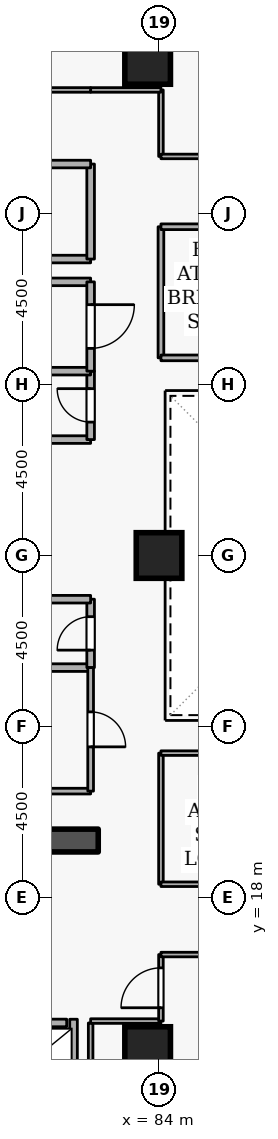
"""IFC4 building model, lengths in metres.
Left out: names, types, materials, properties, quantities, classifications, styles, units other than length and angle.
Written with IfcOpenShell. Run it as: python <this file> out.ifc"""

import sys

from ifc_helpers import new_model, si_unit, direction, frame, frame_2d, origin, origin_2d, place, context, subcontext, project, spatial, rectangle, extrude, element, fill, save


model = new_model("IFC4")
c1 = context("Model", 3, precision=1e-05, world=origin(), true_north=direction((0.0, 1.0)))
c2 = subcontext(c1, "Body", "Model", "MODEL_VIEW")
j1 = project(units=[si_unit("LENGTHUNIT", "METRE"), si_unit("PLANEANGLEUNIT", "RADIAN")], contexts=[c1])
p1 = place(None, origin())
s1 = spatial("IfcSite", under=j1, at=p1, CompositionType="ELEMENT")
p2 = place(p1, origin())
s2 = spatial("IfcBuilding", under=s1, at=p2, CompositionType="ELEMENT")
p3 = place(p2, frame((0.0, 0.0, 108.9)))
s3 = spatial("IfcBuildingStorey", under=s2, at=p3, CompositionType="ELEMENT", Elevation=108.9)
p4 = place(p3, frame((76.7, 19.5, 0.0), z_axis=(0.0, 0.0, 1.0), x_axis=(1.0, 0.0, 0.0)))
e1 = element("IfcWall", 1, at=p4, inside=s3, PredefinedType="SHEAR", context=c2, shape_type="SweptSolid", body=[
    extrude(rectangle(XDim=5.7, YDim=0.6, at=frame_2d((2.85, 0.0))), origin(), (0.0, 0.0, 1.0), 3.6),
])
for number, where, z_axis, x_axis in (
    (2, (83.7, 14.0, 0.0), (0.0, 0.0, 1.0), (1.0, 0.0, 0.0)),
    (3, (83.7, 40.0, 0.0), (0.0, 0.0, 1.0), (1.0, 0.0, 0.0)),
    (4, (84.0, 27.0, 0.0), (0.0, 0.0, 1.0), (1.0, 0.0, 0.0)),
):
    element("IfcColumn", number, at=place(p3, frame(where, z_axis=z_axis, x_axis=x_axis)), inside=s3, PredefinedType="COLUMN", context=c2, shape_type="SweptSolid", body=[
        extrude(rectangle(XDim=1.2, YDim=1.2, at=origin_2d()), origin(), (0.0, 0.0, 1.0), 3.6),
    ])
p5 = place(p3, frame((79.63, 14.7, 0.0), z_axis=(0.0, 0.0, 1.0), x_axis=(1.0, 0.0, 0.0)))
e5 = element("IfcWall", 5, at=p5, inside=s3, PredefinedType="STANDARD", context=c2, shape_type="SweptSolid", body=[
    extrude(rectangle(XDim=1.94, YDim=0.2, at=frame_2d((0.97, 0.0))), origin(), (0.0, 0.0, 1.0), 3.34),
])
p6 = place(p5, frame((0.46, 0.0, 0.0)))
e6 = element("IfcOpeningElement", 6, at=p6, cuts=e5, PredefinedType="OPENING", context=c2, shape_type="SweptSolid", body=[
    extrude(rectangle(XDim=1.02, YDim=2.06, at=frame_2d((0.51, 1.03))), frame((0.0, 0.11, 0.0), z_axis=(0.0, -1.0, 0.0), x_axis=(1.0, 0.0, 0.0)), (0.0, 0.0, 1.0), 0.22),
])
p7 = place(p3, frame((81.75, 12.612, 0.0), z_axis=(0.0, 0.0, 1.0), x_axis=(0.0, 1.0, 0.0)))
e7 = element("IfcWall", 7, at=p7, inside=s3, PredefinedType="STANDARD", context=c2, shape_type="SweptSolid", body=[
    extrude(rectangle(XDim=2.186, YDim=0.2, at=frame_2d((1.093, 0.0))), origin(), (0.0, 0.0, 1.0), 3.34),
])
p8 = place(p3, frame((79.9, 34.8, 0.0), z_axis=(0.0, 0.0, 1.0), x_axis=(1.0, 0.0, 0.0)))
e8 = element("IfcWall", 8, at=p8, inside=s3, PredefinedType="STANDARD", context=c2, shape_type="SweptSolid", body=[
    extrude(rectangle(XDim=2.3, YDim=0.2, at=frame_2d((1.15, 0.0))), origin(), (0.0, 0.0, 1.0), 2.545),
])
p9 = place(p3, frame((82.2, 34.8, 0.0), z_axis=(0.0, 0.0, 1.0), x_axis=(0.0, 1.0, 0.0)))
e9 = element("IfcWall", 9, at=p9, inside=s3, PredefinedType="STANDARD", context=c2, shape_type="SweptSolid", body=[
    extrude(rectangle(XDim=2.5, YDim=0.2, at=frame_2d((1.25, 0.0))), origin(), (0.0, 0.0, 1.0), 3.34),
])
p10 = place(p3, frame((82.2, 37.3, 0.0), z_axis=(0.0, 0.0, 1.0), x_axis=(-1.0, 0.0, 0.0)))
e10 = element("IfcWall", 10, at=p10, inside=s3, PredefinedType="STANDARD", context=c2, shape_type="SweptSolid", body=[
    extrude(rectangle(XDim=5.7, YDim=0.2, at=frame_2d((2.85, 0.0))), origin(), (0.0, 0.0, 1.0), 3.34),
])
p11 = place(p10, frame((2.275, 0.0, 0.0)))
e11 = element("IfcOpeningElement", 11, at=p11, cuts=e10, PredefinedType="OPENING", context=c2, shape_type="SweptSolid", body=[
    extrude(rectangle(XDim=1.15, YDim=2.1, at=frame_2d((0.575, 1.05))), frame((0.0, 0.11, 0.0), z_axis=(0.0, -1.0, 0.0), x_axis=(1.0, 0.0, 0.0)), (0.0, 0.0, 1.0), 0.22),
])
p12 = place(p3, frame((80.15, 24.05, 0.0), z_axis=(0.0, 0.0, 1.0), x_axis=(1.0, 0.0, 0.0)))
e12 = element("IfcWall", 12, at=p12, inside=s3, PredefinedType="STANDARD", context=c2, shape_type="SweptSolid", body=[
    extrude(rectangle(XDim=2.05, YDim=0.2, at=frame_2d((1.025, 0.0))), origin(), (0.0, 0.0, 1.0), 3.34),
])
p13 = place(p3, frame((82.2, 24.05, 0.0), z_axis=(0.0, 0.0, 1.0), x_axis=(0.0, 1.0, 0.0)))
e13 = element("IfcWall", 13, at=p13, inside=s3, PredefinedType="STANDARD", context=c2, shape_type="SweptSolid", body=[
    extrude(rectangle(XDim=1.8, YDim=0.2, at=frame_2d((0.9, 0.0))), origin(), (0.0, 0.0, 1.0), 3.34),
])
p14 = place(p13, frame((0.46, 0.0, 0.0)))
e14 = element("IfcOpeningElement", 14, at=p14, cuts=e13, PredefinedType="OPENING", context=c2, shape_type="SweptSolid", body=[
    extrude(rectangle(XDim=0.88, YDim=2.04, at=frame_2d((0.44, 1.02))), frame((0.0, 0.11, 0.0), z_axis=(0.0, -1.0, 0.0), x_axis=(1.0, 0.0, 0.0)), (0.0, 0.0, 1.0), 0.22),
])
for number, where, z_axis, x_axis in (
    (15, (82.2, 25.85, 0.0), (0.0, 0.0, 1.0), (-1.0, 0.0, 0.0)),
    (16, (80.15, 30.05, 0.0), (0.0, 0.0, 1.0), (1.0, 0.0, 0.0)),
):
    element("IfcWall", number, at=place(p3, frame(where, z_axis=z_axis, x_axis=x_axis)), inside=s3, PredefinedType="STANDARD", context=c2, shape_type="SweptSolid", body=[
        extrude(rectangle(XDim=2.05, YDim=0.2, at=frame_2d((1.025, 0.0))), origin(), (0.0, 0.0, 1.0), 3.34),
    ])
p15 = place(p3, frame((82.2, 30.05, 0.0), z_axis=(0.0, 0.0, 1.0), x_axis=(0.0, 1.0, 0.0)))
e17 = element("IfcWall", 17, at=p15, inside=s3, PredefinedType="STANDARD", context=c2, shape_type="SweptSolid", body=[
    extrude(rectangle(XDim=1.8, YDim=0.2, at=frame_2d((0.9, 0.0))), origin(), (0.0, 0.0, 1.0), 3.34),
])
p16 = place(p15, frame((0.46, 0.0, 0.0)))
e18 = element("IfcOpeningElement", 18, at=p16, cuts=e17, PredefinedType="OPENING", context=c2, shape_type="SweptSolid", body=[
    extrude(rectangle(XDim=0.88, YDim=2.04, at=frame_2d((0.44, 1.02))), frame((0.0, 0.11, 0.0), z_axis=(0.0, -1.0, 0.0), x_axis=(1.0, 0.0, 0.0)), (0.0, 0.0, 1.0), 0.22),
])
p17 = place(p3, frame((82.2, 31.85, 0.0), z_axis=(0.0, 0.0, 1.0), x_axis=(-1.0, 0.0, 0.0)))
e19 = element("IfcWall", 19, at=p17, inside=s3, PredefinedType="STANDARD", context=c2, shape_type="SweptSolid", body=[
    extrude(rectangle(XDim=2.05, YDim=0.2, at=frame_2d((1.025, 0.0))), origin(), (0.0, 0.0, 1.0), 3.34),
])
p18 = place(p3, frame((80.15, 34.2, 0.0), z_axis=(0.0, 0.0, 1.0), x_axis=(1.0, 0.0, 0.0)))
e20 = element("IfcWall", 20, at=p18, inside=s3, PredefinedType="STANDARD", context=c2, shape_type="SweptSolid", body=[
    extrude(rectangle(XDim=2.05, YDim=0.2, at=frame_2d((1.025, 0.0))), origin(), (0.0, 0.0, 1.0), 2.545),
])
p19 = place(p3, frame((82.2, 34.2, 0.0), z_axis=(0.0, 0.0, 1.0), x_axis=(0.0, -1.0, 0.0)))
e21 = element("IfcWall", 21, at=p19, inside=s3, PredefinedType="STANDARD", context=c2, shape_type="SweptSolid", body=[
    extrude(rectangle(XDim=2.35, YDim=0.2, at=frame_2d((1.175, 0.0))), origin(), (0.0, 0.0, 1.0), 3.34),
])
p20 = place(p19, frame((0.6, 0.0, 0.0)))
e22 = element("IfcOpeningElement", 22, at=p20, cuts=e21, PredefinedType="OPENING", context=c2, shape_type="SweptSolid", body=[
    extrude(rectangle(XDim=1.15, YDim=2.1, at=frame_2d((0.575, 1.05))), frame((0.0, 0.11, 0.0), z_axis=(0.0, -1.0, 0.0), x_axis=(1.0, 0.0, 0.0)), (0.0, 0.0, 1.0), 0.22),
])
p21 = place(p3, frame((82.2, 20.8, 0.0), z_axis=(0.0, 0.0, 1.0), x_axis=(-1.0, 0.0, 0.0)))
e23 = element("IfcWall", 23, at=p21, inside=s3, PredefinedType="PARTITIONING", context=c2, shape_type="SweptSolid", body=[
    extrude(rectangle(XDim=2.05, YDim=0.15, at=frame_2d((1.025, 0.0))), origin(), (0.0, 0.0, 1.0), 3.34),
])
p22 = place(p3, frame((82.2, 24.05, 0.0), z_axis=(0.0, 0.0, 1.0), x_axis=(0.0, -1.0, 0.0)))
e24 = element("IfcWall", 24, at=p22, inside=s3, PredefinedType="PARTITIONING", context=c2, shape_type="SweptSolid", body=[
    extrude(rectangle(XDim=3.25, YDim=0.15, at=frame_2d((1.625, 0.0))), origin(), (0.0, 0.0, 1.0), 3.34),
])
p23 = place(p22, frame((1.165, 0.0, 0.0)))
e25 = element("IfcOpeningElement", 25, at=p23, cuts=e24, PredefinedType="OPENING", context=c2, shape_type="SweptSolid", body=[
    extrude(rectangle(XDim=0.92, YDim=2.08, at=frame_2d((0.46, 1.04))), frame((0.0, 0.085, 0.0), z_axis=(0.0, -1.0, 0.0), x_axis=(1.0, 0.0, 0.0)), (0.0, 0.0, 1.0), 0.17),
])
p24 = place(p3, frame((82.2, 12.4, 0.0), z_axis=(0.0, 0.0, 1.0), x_axis=(0.0, 1.0, 0.0)))
e26 = element("IfcWall", 26, at=p24, inside=s3, PredefinedType="PARTITIONING", context=c2, shape_type="SweptSolid", body=[
    extrude(rectangle(XDim=2.3, YDim=0.12, at=frame_2d((1.15, 0.0))), origin(), (0.0, 0.0, 1.0), 3.34),
])
p25 = place(p3, frame((82.2, 14.75, 0.0), z_axis=(0.0, 0.0, 1.0), x_axis=(1.0, 0.0, 0.0)))
e27 = element("IfcWall", 27, at=p25, inside=s3, PredefinedType="PARTITIONING", context=c2, shape_type="SweptSolid", body=[
    extrude(rectangle(XDim=1.85, YDim=0.12, at=frame_2d((0.925, 0.0))), origin(), (0.0, 0.0, 1.0), 3.34),
])
p26 = place(p3, frame((84.05, 14.75, 0.0), z_axis=(0.0, 0.0, 1.0), x_axis=(0.0, 1.0, 0.0)))
e28 = element("IfcWall", 28, at=p26, inside=s3, PredefinedType="PARTITIONING", context=c2, shape_type="SweptSolid", body=[
    extrude(rectangle(XDim=1.75, YDim=0.12, at=frame_2d((0.875, 0.0))), origin(), (0.0, 0.0, 1.0), 3.34),
])
p27 = place(p26, frame((0.35, 0.0, 0.0)))
e29 = element("IfcOpeningElement", 29, at=p27, cuts=e28, PredefinedType="OPENING", context=c2, shape_type="SweptSolid", body=[
    extrude(rectangle(XDim=1.05, YDim=2.1, at=frame_2d((0.525, 1.05))), frame((0.0, 0.07, 0.0), z_axis=(0.0, -1.0, 0.0), x_axis=(1.0, 0.0, 0.0)), (0.0, 0.0, 1.0), 0.14),
])
p28 = place(p3, frame((84.05, 16.5, 0.0), z_axis=(0.0, 0.0, 1.0), x_axis=(1.0, 0.0, 0.0)))
e30 = element("IfcWall", 30, at=p28, inside=s3, PredefinedType="PARTITIONING", context=c2, shape_type="SweptSolid", body=[
    extrude(rectangle(XDim=1.3, YDim=0.12, at=frame_2d((0.65, 0.0))), origin(), (0.0, 0.0, 1.0), 3.34),
])
p29 = place(p3, frame((84.05, 37.5, 0.0), z_axis=(0.0, 0.0, 1.0), x_axis=(0.0, 1.0, 0.0)))
e31 = element("IfcWall", 31, at=p29, inside=s3, PredefinedType="PARTITIONING", context=c2, shape_type="SweptSolid", body=[
    extrude(rectangle(XDim=1.75, YDim=0.12, at=frame_2d((0.875, 0.0))), origin(), (0.0, 0.0, 1.0), 3.34),
])
p30 = place(p3, frame((84.05, 39.25, 0.0), z_axis=(0.0, 0.0, 1.0), x_axis=(-1.0, 0.0, 0.0)))
e32 = element("IfcWall", 32, at=p30, inside=s3, PredefinedType="PARTITIONING", context=c2, shape_type="SweptSolid", body=[
    extrude(rectangle(XDim=1.85, YDim=0.12, at=frame_2d((0.925, 0.0))), origin(), (0.0, 0.0, 1.0), 3.34),
])
p31 = place(p3, frame((82.2, 39.25, 0.0), z_axis=(0.0, 0.0, 1.0), x_axis=(-1.0, 0.0, 0.0)))
e33 = element("IfcWall", 33, at=p31, inside=s3, PredefinedType="PARTITIONING", context=c2, shape_type="SweptSolid", body=[
    extrude(rectangle(XDim=9.35, YDim=0.12, at=frame_2d((4.675, 0.0))), origin(), (0.0, 0.0, 1.0), 3.34),
])
p32 = place(p31, frame((4.2, 0.0, 0.0)))
e34 = element("IfcOpeningElement", 34, at=p32, cuts=e33, PredefinedType="OPENING", context=c2, shape_type="SweptSolid", body=[
    extrude(rectangle(XDim=0.95, YDim=2.1, at=frame_2d((0.475, 1.05))), frame((0.0, 0.07, 0.0), z_axis=(0.0, -1.0, 0.0), x_axis=(1.0, 0.0, 0.0)), (0.0, 0.0, 1.0), 0.14),
])
p33 = place(p3, frame((85.35, 37.5, 0.0), z_axis=(0.0, 0.0, 1.0), x_axis=(-1.0, 0.0, 0.0)))
e35 = element("IfcWall", 35, at=p33, inside=s3, PredefinedType="PARTITIONING", context=c2, shape_type="SweptSolid", body=[
    extrude(rectangle(XDim=1.3, YDim=0.12, at=frame_2d((0.65, 0.0))), origin(), (0.0, 0.0, 1.0), 3.34),
])
p34 = place(p3, frame((84.05, 32.2, 0.0), z_axis=(0.0, 0.0, 1.0), x_axis=(0.0, 1.0, 0.0)))
e36 = element("IfcWall", 36, at=p34, inside=s3, PredefinedType="PARTITIONING", context=c2, shape_type="SweptSolid", body=[
    extrude(rectangle(XDim=3.45, YDim=0.15, at=frame_2d((1.725, 0.0))), origin(), (0.0, 0.0, 1.0), 3.34),
])
p35 = place(p3, frame((84.05, 35.65, 0.0), z_axis=(0.0, 0.0, 1.0), x_axis=(1.0, 0.0, 0.0)))
e37 = element("IfcWall", 37, at=p35, inside=s3, PredefinedType="PARTITIONING", context=c2, shape_type="SweptSolid", body=[
    extrude(rectangle(XDim=8.9, YDim=0.15, at=frame_2d((4.45, 0.0))), origin(), (0.0, 0.0, 1.0), 3.34),
])
p36 = place(p35, frame((3.8, 0.0, 0.0)))
e38 = element("IfcOpeningElement", 38, at=p36, cuts=e37, PredefinedType="OPENING", context=c2, shape_type="SweptSolid", body=[
    extrude(rectangle(XDim=1.3, YDim=2.12, at=frame_2d((0.65, 1.06))), frame((0.0, 0.085, 0.0), z_axis=(0.0, -1.0, 0.0), x_axis=(1.0, 0.0, 0.0)), (0.0, 0.0, 1.0), 0.17),
])
p37 = place(p3, frame((92.95, 32.2, 0.0), z_axis=(0.0, 0.0, 1.0), x_axis=(-1.0, 0.0, 0.0)))
e39 = element("IfcWall", 39, at=p37, inside=s3, PredefinedType="PARTITIONING", context=c2, shape_type="SweptSolid", body=[
    extrude(rectangle(XDim=8.9, YDim=0.15, at=frame_2d((4.45, 0.0))), origin(), (0.0, 0.0, 1.0), 3.34),
])
p38 = place(p3, frame((84.05, 18.35, 0.0), z_axis=(0.0, 0.0, 1.0), x_axis=(0.0, 1.0, 0.0)))
e40 = element("IfcWall", 40, at=p38, inside=s3, PredefinedType="PARTITIONING", context=c2, shape_type="SweptSolid", body=[
    extrude(rectangle(XDim=3.45, YDim=0.12, at=frame_2d((1.725, 0.0))), origin(), (0.0, 0.0, 1.0), 3.34),
])
p39 = place(p3, frame((84.05, 21.8, 0.0), z_axis=(0.0, 0.0, 1.0), x_axis=(1.0, 0.0, 0.0)))
e41 = element("IfcWall", 41, at=p39, inside=s3, PredefinedType="PARTITIONING", context=c2, shape_type="SweptSolid", body=[
    extrude(rectangle(XDim=8.9, YDim=0.12, at=frame_2d((4.45, 0.0))), origin(), (0.0, 0.0, 1.0), 3.34),
])
p40 = place(p3, frame((92.95, 18.35, 0.0), z_axis=(0.0, 0.0, 1.0), x_axis=(-1.0, 0.0, 0.0)))
e42 = element("IfcWall", 42, at=p40, inside=s3, PredefinedType="PARTITIONING", context=c2, shape_type="SweptSolid", body=[
    extrude(rectangle(XDim=8.9, YDim=0.12, at=frame_2d((4.45, 0.0))), origin(), (0.0, 0.0, 1.0), 3.34),
])
p41 = place(p40, frame((3.975, 0.0, 0.0)))
e43 = element("IfcOpeningElement", 43, at=p41, cuts=e42, PredefinedType="OPENING", context=c2, shape_type="SweptSolid", body=[
    extrude(rectangle(XDim=0.95, YDim=2.1, at=frame_2d((0.475, 1.05))), frame((0.0, 0.07, 0.0), z_axis=(0.0, -1.0, 0.0), x_axis=(1.0, 0.0, 0.0)), (0.0, 0.0, 1.0), 0.14),
])
p42 = place(p14, origin())
e44 = element("IfcDoor", 44, at=p42, inside=s3, OperationType="SINGLE_SWING_LEFT", PredefinedType="DOOR", context=c2, shape_type="SweptSolid", body=[
    extrude(rectangle(XDim=0.88, YDim=2.04, at=frame_2d((0.44, 1.02))), frame((0.0, 0.025, 0.0), z_axis=(0.0, -1.0, 0.0), x_axis=(1.0, 0.0, 0.0)), (0.0, 0.0, 1.0), 0.05),
])
fill(e14, e44)
p43 = place(p16, origin())
e45 = element("IfcDoor", 45, at=p43, inside=s3, OperationType="SINGLE_SWING_RIGHT", PredefinedType="DOOR", context=c2, shape_type="SweptSolid", body=[
    extrude(rectangle(XDim=0.88, YDim=2.04, at=frame_2d((0.44, 1.02))), frame((0.0, 0.025, 0.0), z_axis=(0.0, -1.0, 0.0), x_axis=(1.0, 0.0, 0.0)), (0.0, 0.0, 1.0), 0.05),
])
fill(e18, e45)
p44 = place(p23, origin())
e46 = element("IfcDoor", 46, at=p44, inside=s3, OperationType="SINGLE_SWING_RIGHT", PredefinedType="DOOR", context=c2, shape_type="SweptSolid", body=[
    extrude(rectangle(XDim=0.92, YDim=2.08, at=frame_2d((0.46, 1.04))), frame((0.0, 0.025, 0.0), z_axis=(0.0, -1.0, 0.0), x_axis=(1.0, 0.0, 0.0)), (0.0, 0.0, 1.0), 0.05),
])
fill(e25, e46)
p45 = place(p20, origin())
e47 = element("IfcDoor", 47, at=p45, inside=s3, OperationType="SINGLE_SWING_LEFT", PredefinedType="DOOR", context=c2, shape_type="SweptSolid", body=[
    extrude(rectangle(XDim=1.15, YDim=2.1, at=frame_2d((0.575, 1.05))), frame((0.0, 0.025, 0.0), z_axis=(0.0, -1.0, 0.0), x_axis=(1.0, 0.0, 0.0)), (0.0, 0.0, 1.0), 0.05),
])
fill(e22, e47)
p46 = place(p27, origin())
e48 = element("IfcDoor", 48, at=p46, inside=s3, OperationType="SINGLE_SWING_LEFT", PredefinedType="DOOR", context=c2, shape_type="SweptSolid", body=[
    extrude(rectangle(XDim=1.05, YDim=2.1, at=frame_2d((0.525, 1.05))), frame((0.0, 0.025, 0.0), z_axis=(0.0, -1.0, 0.0), x_axis=(1.0, 0.0, 0.0)), (0.0, 0.0, 1.0), 0.05),
])
fill(e29, e48)
save(model, sys.argv[1])
